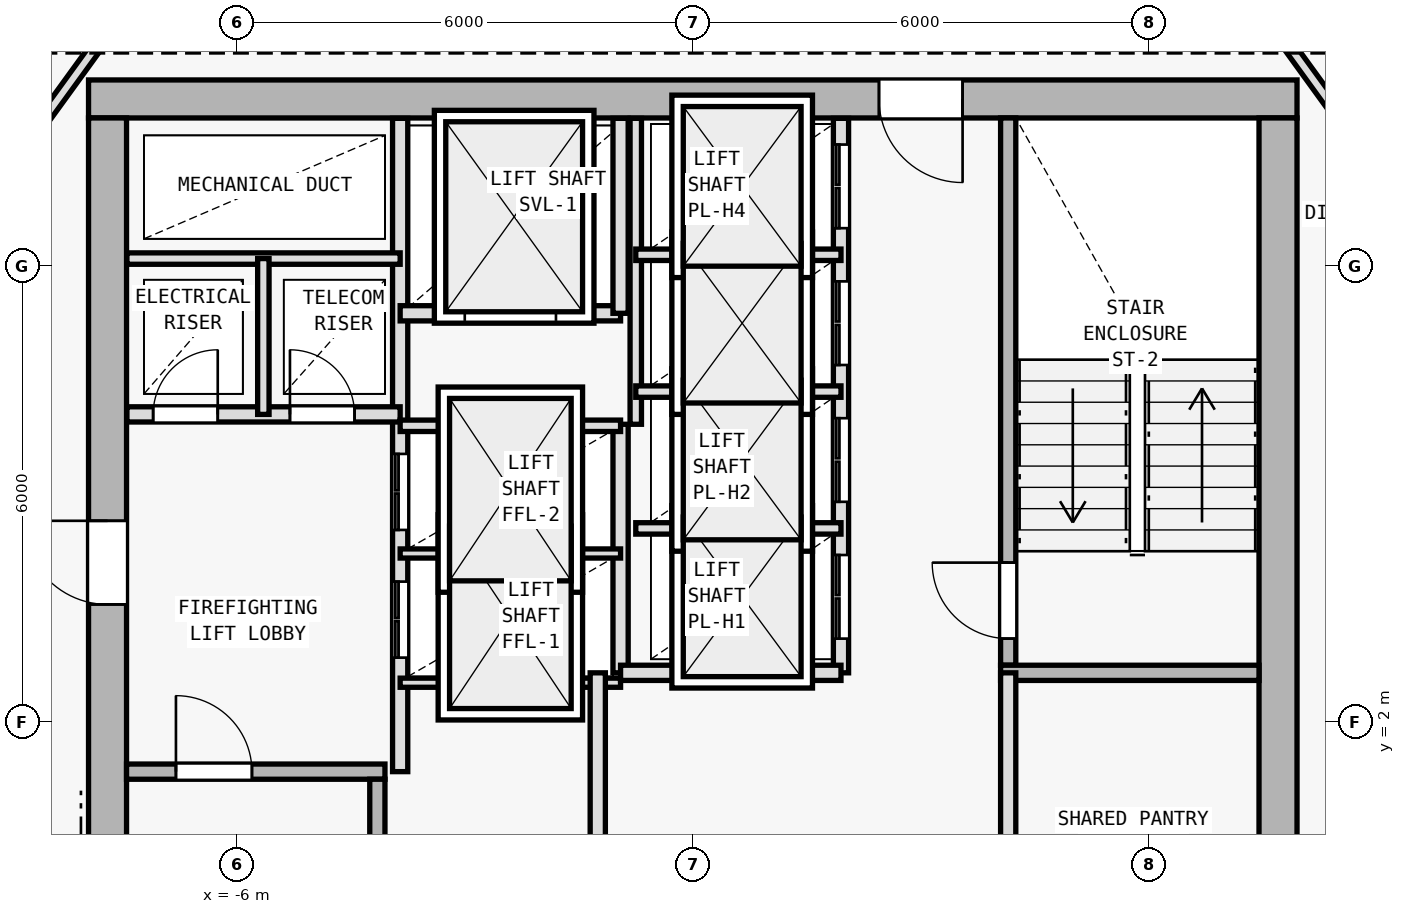
"""IFC4 building model, lengths in metres.
Left out: names, types, materials, properties, quantities, classifications, styles, units other than length and angle.
Written with IfcOpenShell. Run it as: python <this file> out.ifc"""

import sys

from ifc_helpers import new_model, si_unit, direction, frame, frame_2d, origin, origin_2d, place, context, subcontext, project, spatial, rectangle, i_section, extrude, element, fill, save


model = new_model("IFC4")
c1 = context("Model", 3, precision=1e-05, world=origin(), true_north=direction((0.0, 1.0)))
c2 = subcontext(c1, "Body", "Model", "MODEL_VIEW")
j1 = project(units=[si_unit("LENGTHUNIT", "METRE"), si_unit("PLANEANGLEUNIT", "RADIAN")], contexts=[c1])
p1 = place(None, origin())
s1 = spatial("IfcSite", under=j1, at=p1, CompositionType="ELEMENT")
p2 = place(p1, origin())
s2 = spatial("IfcBuilding", under=s1, at=p2, CompositionType="ELEMENT")
p3 = place(p2, frame((0.0, 0.0, 265.2)))
s3 = spatial("IfcBuildingStorey", under=s2, at=p3, CompositionType="ELEMENT", Elevation=265.2)
for number, where, z_axis, x_axis in (
    (1, (7.7, 10.2, 0.0), (0.0, 0.0, 1.0), (1.0, 0.0, 0.0)),
    (2, (-7.7, 10.2, 0.0), (0.0, 0.0, 1.0), (1.0, 0.0, 0.0)),
    (3, (7.7, 0.4, 0.0), (0.0, 0.0, 1.0), (1.0, 0.0, 0.0)),
    (4, (-7.7, 2.0, 0.0), (0.0, 0.0, 1.0), (1.0, 0.0, 0.0)),
):
    element("IfcColumn", number, at=place(p3, frame(where, z_axis=z_axis, x_axis=x_axis)), inside=s3, PredefinedType="COLUMN", context=c2, shape_type="SweptSolid", body=[
        extrude(i_section(OverallWidth=0.374, OverallDepth=0.372, WebThickness=0.012, FlangeThickness=0.02, FilletRadius=0.015, at=origin_2d()), origin(), (0.0, 0.0, 1.0), 3.6),
    ])
p4 = place(p3, frame((7.95, 10.2, 0.0), z_axis=(0.0, 0.0, 1.0), x_axis=(-1.0, 0.0, 0.0)))
e5 = element("IfcWall", 5, at=p4, inside=s3, PredefinedType="SHEAR", context=c2, shape_type="SweptSolid", body=[
    extrude(rectangle(XDim=15.9, YDim=0.5, at=frame_2d((7.95, 0.0))), origin(), (0.0, 0.0, 1.0), 3.35),
])
p5 = place(p4, frame((4.4, 0.0, 0.0)))
e6 = element("IfcOpeningElement", 6, at=p5, cuts=e5, PredefinedType="OPENING", context=c2, shape_type="SweptSolid", body=[
    extrude(rectangle(XDim=1.1, YDim=2.15, at=frame_2d((0.55, 1.075))), frame((0.0, 0.26, 0.0), z_axis=(0.0, -1.0, 0.0), x_axis=(1.0, 0.0, 0.0)), (0.0, 0.0, 1.0), 0.52),
])
p6 = place(p3, frame((-7.7, -9.15, 0.0), z_axis=(0.0, 0.0, 1.0), x_axis=(0.0, 1.0, 0.0)))
e7 = element("IfcWall", 7, at=p6, inside=s3, PredefinedType="SHEAR", context=c2, shape_type="SweptSolid", body=[
    extrude(rectangle(XDim=19.1, YDim=0.5, at=frame_2d((9.55, 0.0))), origin(), (0.0, 0.0, 1.0), 3.35),
])
p7 = place(p6, frame((12.7, 0.0, 0.0)))
e8 = element("IfcOpeningElement", 8, at=p7, cuts=e7, PredefinedType="OPENING", context=c2, shape_type="SweptSolid", body=[
    extrude(rectangle(XDim=1.1, YDim=2.15, at=frame_2d((0.55, 1.075))), frame((0.0, 0.26, 0.0), z_axis=(0.0, -1.0, 0.0), x_axis=(1.0, 0.0, 0.0)), (0.0, 0.0, 1.0), 0.52),
])
p8 = place(p3, frame((7.7, 9.95, 0.0), z_axis=(0.0, 0.0, 1.0), x_axis=(0.0, -1.0, 0.0)))
e9 = element("IfcWall", 9, at=p8, inside=s3, PredefinedType="SHEAR", context=c2, shape_type="SweptSolid", body=[
    extrude(rectangle(XDim=19.1, YDim=0.5, at=frame_2d((9.55, 0.0))), origin(), (0.0, 0.0, 1.0), 3.35),
])
p9 = place(p3, frame((-7.45, 1.35, 0.0), z_axis=(0.0, 0.0, 1.0), x_axis=(1.0, 0.0, 0.0)))
e10 = element("IfcWall", 10, at=p9, inside=s3, PredefinedType="SOLIDWALL", context=c2, shape_type="SweptSolid", body=[
    extrude(rectangle(XDim=3.4, YDim=0.2, at=frame_2d((1.7, 0.0))), origin(), (0.0, 0.0, 1.0), 3.35),
])
p10 = place(p9, frame((0.65, 0.0, 0.0)))
e11 = element("IfcOpeningElement", 11, at=p10, cuts=e10, PredefinedType="OPENING", context=c2, shape_type="SweptSolid", body=[
    extrude(rectangle(XDim=1.0, YDim=2.15, at=frame_2d((0.5, 1.075))), frame((0.0, 0.11, 0.0), z_axis=(0.0, -1.0, 0.0), x_axis=(1.0, 0.0, 0.0)), (0.0, 0.0, 1.0), 0.22),
])
p11 = place(p3, frame((-4.15, -5.95, 0.0), z_axis=(0.0, 0.0, 1.0), x_axis=(0.0, 1.0, 0.0)))
e12 = element("IfcWall", 12, at=p11, inside=s3, PredefinedType="SOLIDWALL", context=c2, shape_type="SweptSolid", body=[
    extrude(rectangle(XDim=7.2, YDim=0.2, at=frame_2d((3.6, 0.0))), origin(), (0.0, 0.0, 1.0), 3.35),
])
p12 = place(p3, frame((-3.85, 1.35, 0.0), z_axis=(0.0, 0.0, 1.0), x_axis=(0.0, 1.0, 0.0)))
e13 = element("IfcWall", 13, at=p12, inside=s3, PredefinedType="SOLIDWALL", context=c2, shape_type="SweptSolid", body=[
    extrude(rectangle(XDim=8.595, YDim=0.2, at=frame_2d((4.297, 0.0))), origin(), (0.0, 0.0, 1.0), 3.35),
])
p13 = place(p12, frame((1.5, 0.0, 0.0)))
e14 = element("IfcOpeningElement", 14, at=p13, cuts=e13, PredefinedType="OPENING", context=c2, shape_type="SweptSolid", body=[
    extrude(rectangle(XDim=1.0, YDim=2.15, at=frame_2d((0.5, 1.075))), frame((0.0, 0.11, 0.0), z_axis=(0.0, -1.0, 0.0), x_axis=(1.0, 0.0, 0.0)), (0.0, 0.0, 1.0), 0.22),
])
p14 = place(p12, frame((3.18, 0.0, 0.0)))
e15 = element("IfcOpeningElement", 15, at=p14, cuts=e13, PredefinedType="OPENING", context=c2, shape_type="SweptSolid", body=[
    extrude(rectangle(XDim=1.0, YDim=2.15, at=frame_2d((0.5, 1.075))), frame((0.0, 0.11, 0.0), z_axis=(0.0, -1.0, 0.0), x_axis=(1.0, 0.0, 0.0)), (0.0, 0.0, 1.0), 0.22),
])
p15 = place(p3, frame((-7.445, 6.05, 0.0), z_axis=(0.0, 0.0, 1.0), x_axis=(1.0, 0.0, 0.0)))
e16 = element("IfcWall", 16, at=p15, inside=s3, PredefinedType="SOLIDWALL", context=c2, shape_type="SweptSolid", body=[
    extrude(rectangle(XDim=3.595, YDim=0.2, at=frame_2d((1.797, 0.0))), origin(), (0.0, 0.0, 1.0), 3.35),
])
p16 = place(p15, frame((0.345, 0.0, 0.0)))
e17 = element("IfcOpeningElement", 17, at=p16, cuts=e16, PredefinedType="OPENING", context=c2, shape_type="SweptSolid", body=[
    extrude(rectangle(XDim=0.85, YDim=2.1, at=frame_2d((0.425, 1.05))), frame((0.0, 0.11, 0.0), z_axis=(0.0, -1.0, 0.0), x_axis=(1.0, 0.0, 0.0)), (0.0, 0.0, 1.0), 0.22),
])
p17 = place(p15, frame((2.145, 0.0, 0.0)))
e18 = element("IfcOpeningElement", 18, at=p17, cuts=e16, PredefinedType="OPENING", context=c2, shape_type="SweptSolid", body=[
    extrude(rectangle(XDim=0.85, YDim=2.1, at=frame_2d((0.425, 1.05))), frame((0.0, 0.11, 0.0), z_axis=(0.0, -1.0, 0.0), x_axis=(1.0, 0.0, 0.0)), (0.0, 0.0, 1.0), 0.22),
])
p18 = place(p3, frame((-7.445, 8.1, 0.0), z_axis=(0.0, 0.0, 1.0), x_axis=(1.0, 0.0, 0.0)))
e19 = element("IfcWall", 19, at=p18, inside=s3, PredefinedType="PARTITIONING", context=c2, shape_type="SweptSolid", body=[
    extrude(rectangle(XDim=3.595, YDim=0.15, at=frame_2d((1.797, 0.0))), origin(), (0.0, 0.0, 1.0), 3.35),
])
p19 = place(p3, frame((-5.65, 6.05, 0.0), z_axis=(0.0, 0.0, 1.0), x_axis=(0.0, 1.0, 0.0)))
e20 = element("IfcWall", 20, at=p19, inside=s3, PredefinedType="PARTITIONING", context=c2, shape_type="SweptSolid", body=[
    extrude(rectangle(XDim=2.05, YDim=0.15, at=frame_2d((1.025, 0.0))), origin(), (0.0, 0.0, 1.0), 3.35),
])
p20 = place(p3, frame((4.15, 2.75, 0.0), z_axis=(0.0, 0.0, 1.0), x_axis=(0.0, 1.0, 0.0)))
e21 = element("IfcWall", 21, at=p20, inside=s3, PredefinedType="SOLIDWALL", context=c2, shape_type="SweptSolid", body=[
    extrude(rectangle(XDim=7.2, YDim=0.2, at=frame_2d((3.6, 0.0))), origin(), (0.0, 0.0, 1.0), 3.35),
])
p21 = place(p20, frame((0.35, 0.0, 0.0)))
e22 = element("IfcOpeningElement", 22, at=p21, cuts=e21, PredefinedType="OPENING", context=c2, shape_type="SweptSolid", body=[
    extrude(rectangle(XDim=1.0, YDim=2.15, at=frame_2d((0.5, 1.075))), frame((0.0, 0.11, 0.0), z_axis=(0.0, -1.0, 0.0), x_axis=(1.0, 0.0, 0.0)), (0.0, 0.0, 1.0), 0.22),
])
p22 = place(p3, frame((4.05, 2.65, 0.0), z_axis=(0.0, 0.0, 1.0), x_axis=(1.0, 0.0, 0.0)))
e23 = element("IfcWall", 23, at=p22, inside=s3, PredefinedType="SOLIDWALL", context=c2, shape_type="SweptSolid", body=[
    extrude(rectangle(XDim=3.4, YDim=0.2, at=frame_2d((1.7, 0.0))), origin(), (0.0, 0.0, 1.0), 3.35),
])
p23 = place(p3, frame((-0.95, 2.65, 0.0), z_axis=(0.0, 0.0, 1.0), x_axis=(0.0, 1.0, 0.0)))
e24 = element("IfcWall", 24, at=p23, inside=s3, PredefinedType="SOLIDWALL", context=c2, shape_type="SweptSolid", body=[
    extrude(rectangle(XDim=3.27, YDim=0.2, at=frame_2d((1.635, 0.0))), origin(), (0.0, 0.0, 1.0), 3.35),
])
for number, where, z_axis, x_axis in (
    (25, (-3.85, 2.52, 0.0), (0.0, 0.0, 1.0), (1.0, 0.0, 0.0)),
    (26, (-3.85, 4.22, 0.0), (0.0, 0.0, 1.0), (1.0, 0.0, 0.0)),
):
    element("IfcWall", number, at=place(p3, frame(where, z_axis=z_axis, x_axis=x_axis)), inside=s3, PredefinedType="PARTITIONING", context=c2, shape_type="SweptSolid", body=[
        extrude(rectangle(XDim=2.9, YDim=0.12, at=frame_2d((1.45, 0.0))), origin(), (0.0, 0.0, 1.0), 3.35),
    ])
p24 = place(p3, frame((-3.85, 5.9, 0.0), z_axis=(0.0, 0.0, 1.0), x_axis=(1.0, 0.0, 0.0)))
e27 = element("IfcWall", 27, at=p24, inside=s3, PredefinedType="PARTITIONING", context=c2, shape_type="SweptSolid", body=[
    extrude(rectangle(XDim=2.9, YDim=0.15, at=frame_2d((1.45, 0.0))), origin(), (0.0, 0.0, 1.0), 3.35),
])
p25 = place(p3, frame((-3.85, 7.38, 0.0), z_axis=(0.0, 0.0, 1.0), x_axis=(1.0, 0.0, 0.0)))
e28 = element("IfcWall", 28, at=p25, inside=s3, PredefinedType="SOLIDWALL", context=c2, shape_type="SweptSolid", body=[
    extrude(rectangle(XDim=2.9, YDim=0.2, at=frame_2d((1.45, 0.0))), origin(), (0.0, 0.0, 1.0), 3.35),
])
p26 = place(p25, frame((0.85, 0.0, 0.0)))
e29 = element("IfcOpeningElement", 29, at=p26, cuts=e28, PredefinedType="OPENING", context=c2, shape_type="SweptSolid", body=[
    extrude(rectangle(XDim=1.2, YDim=2.2, at=frame_2d((0.6, 1.1))), frame((0.0, 0.11, 0.0), z_axis=(0.0, -1.0, 0.0), x_axis=(1.0, 0.0, 0.0)), (0.0, 0.0, 1.0), 0.22),
])
p27 = place(p3, frame((-0.95, 7.38, 0.0), z_axis=(0.0, 0.0, 1.0), x_axis=(0.0, 1.0, 0.0)))
e30 = element("IfcWall", 30, at=p27, inside=s3, PredefinedType="SOLIDWALL", context=c2, shape_type="SweptSolid", body=[
    extrude(rectangle(XDim=2.565, YDim=0.2, at=frame_2d((1.283, 0.0))), origin(), (0.0, 0.0, 1.0), 3.35),
])
p28 = place(p3, frame((4.15, -6.05, 0.0), z_axis=(0.0, 0.0, 1.0), x_axis=(0.0, 1.0, 0.0)))
e31 = element("IfcWall", 31, at=p28, inside=s3, PredefinedType="SOLIDWALL", context=c2, shape_type="SweptSolid", body=[
    extrude(rectangle(XDim=8.7, YDim=0.2, at=frame_2d((4.35, 0.0))), origin(), (0.0, 0.0, 1.0), 3.35),
])
p29 = place(p28, frame((3.6, 0.0, 0.0)))
e32 = element("IfcOpeningElement", 32, at=p29, cuts=e31, PredefinedType="OPENING", context=c2, shape_type="SweptSolid", body=[
    extrude(rectangle(XDim=0.95, YDim=2.1, at=frame_2d((0.475, 1.05))), frame((0.0, 0.11, 0.0), z_axis=(0.0, -1.0, 0.0), x_axis=(1.0, 0.0, 0.0)), (0.0, 0.0, 1.0), 0.22),
])
p30 = place(p3, frame((-1.25, -6.05, 0.0), z_axis=(0.0, 0.0, 1.0), x_axis=(0.0, 1.0, 0.0)))
e33 = element("IfcWall", 33, at=p30, inside=s3, PredefinedType="SOLIDWALL", context=c2, shape_type="SweptSolid", body=[
    extrude(rectangle(XDim=8.7, YDim=0.2, at=frame_2d((4.35, 0.0))), origin(), (0.0, 0.0, 1.0), 3.35),
])
p31 = place(p30, frame((3.4, 0.0, 0.0)))
e34 = element("IfcOpeningElement", 34, at=p31, cuts=e33, PredefinedType="OPENING", context=c2, shape_type="SweptSolid", body=[
    extrude(rectangle(XDim=0.95, YDim=2.1, at=frame_2d((0.475, 1.05))), frame((0.0, 0.11, 0.0), z_axis=(0.0, -1.0, 0.0), x_axis=(1.0, 0.0, 0.0)), (0.0, 0.0, 1.0), 0.22),
])
p32 = place(p3, frame((1.95, 2.65, 0.0), z_axis=(0.0, 0.0, 1.0), x_axis=(0.0, 1.0, 0.0)))
e35 = element("IfcWall", 35, at=p32, inside=s3, PredefinedType="SOLIDWALL", context=c2, shape_type="SweptSolid", body=[
    extrude(rectangle(XDim=7.295, YDim=0.2, at=frame_2d((3.647, 0.0))), origin(), (0.0, 0.0, 1.0), 3.35),
])
p33 = place(p32, frame((0.45, 0.0, 0.0)))
e36 = element("IfcOpeningElement", 36, at=p33, cuts=e35, PredefinedType="OPENING", context=c2, shape_type="SweptSolid", body=[
    extrude(rectangle(XDim=1.1, YDim=2.15, at=frame_2d((0.55, 1.075))), frame((0.0, 0.11, 0.0), z_axis=(0.0, -1.0, 0.0), x_axis=(1.0, 0.0, 0.0)), (0.0, 0.0, 1.0), 0.22),
])
p34 = place(p32, frame((2.25, 0.0, 0.0)))
e37 = element("IfcOpeningElement", 37, at=p34, cuts=e35, PredefinedType="OPENING", context=c2, shape_type="SweptSolid", body=[
    extrude(rectangle(XDim=1.1, YDim=2.15, at=frame_2d((0.55, 1.075))), frame((0.0, 0.11, 0.0), z_axis=(0.0, -1.0, 0.0), x_axis=(1.0, 0.0, 0.0)), (0.0, 0.0, 1.0), 0.22),
])
p35 = place(p32, frame((4.05, 0.0, 0.0)))
e38 = element("IfcOpeningElement", 38, at=p35, cuts=e35, PredefinedType="OPENING", context=c2, shape_type="SweptSolid", body=[
    extrude(rectangle(XDim=1.1, YDim=2.15, at=frame_2d((0.55, 1.075))), frame((0.0, 0.11, 0.0), z_axis=(0.0, -1.0, 0.0), x_axis=(1.0, 0.0, 0.0)), (0.0, 0.0, 1.0), 0.22),
])
p36 = place(p32, frame((5.85, 0.0, 0.0)))
e39 = element("IfcOpeningElement", 39, at=p36, cuts=e35, PredefinedType="OPENING", context=c2, shape_type="SweptSolid", body=[
    extrude(rectangle(XDim=1.1, YDim=2.15, at=frame_2d((0.55, 1.075))), frame((0.0, 0.11, 0.0), z_axis=(0.0, -1.0, 0.0), x_axis=(1.0, 0.0, 0.0)), (0.0, 0.0, 1.0), 0.22),
])
p37 = place(p3, frame((-0.95, 2.65, 0.0), z_axis=(0.0, 0.0, 1.0), x_axis=(1.0, 0.0, 0.0)))
e40 = element("IfcWall", 40, at=p37, inside=s3, PredefinedType="SOLIDWALL", context=c2, shape_type="SweptSolid", body=[
    extrude(rectangle(XDim=2.9, YDim=0.2, at=frame_2d((1.45, 0.0))), origin(), (0.0, 0.0, 1.0), 3.35),
])
p38 = place(p3, frame((-0.75, 5.92, 0.0), z_axis=(0.0, 0.0, 1.0), x_axis=(0.0, 1.0, 0.0)))
e41 = element("IfcWall", 41, at=p38, inside=s3, PredefinedType="PARTITIONING", context=c2, shape_type="SweptSolid", body=[
    extrude(rectangle(XDim=4.025, YDim=0.15, at=frame_2d((2.013, 0.0))), origin(), (0.0, 0.0, 1.0), 3.35),
])
for number, where, z_axis, x_axis in (
    (42, (-0.75, 4.55, 0.0), (0.0, 0.0, 1.0), (1.0, 0.0, 0.0)),
    (43, (-0.75, 6.35, 0.0), (0.0, 0.0, 1.0), (1.0, 0.0, 0.0)),
    (44, (-0.75, 8.15, 0.0), (0.0, 0.0, 1.0), (1.0, 0.0, 0.0)),
):
    element("IfcWall", number, at=place(p3, frame(where, z_axis=z_axis, x_axis=x_axis)), inside=s3, PredefinedType="PARTITIONING", context=c2, shape_type="SweptSolid", body=[
        extrude(rectangle(XDim=2.7, YDim=0.15, at=frame_2d((1.35, 0.0))), origin(), (0.0, 0.0, 1.0), 3.35),
    ])
p39 = place(p3, frame((-9.78, 8.226, 0.0), z_axis=(0.0, 0.0, 1.0), x_axis=(0.586956386413, 0.809618552436, 0.0)))
e45 = element("IfcWall", 45, at=p39, inside=s3, PredefinedType="PARTITIONING", context=c2, shape_type="SweptSolid", body=[
    extrude(rectangle(XDim=5.008, YDim=0.15, at=frame_2d((2.504, 0.0))), origin(), (0.0, 0.0, 1.0), 3.015),
])
p40 = place(p3, frame((6.841, 12.28, 0.0), z_axis=(0.0, 0.0, 1.0), x_axis=(0.586956386413, -0.809618552436, 0.0)))
e46 = element("IfcWall", 46, at=p40, inside=s3, PredefinedType="PARTITIONING", context=c2, shape_type="SweptSolid", body=[
    extrude(rectangle(XDim=5.008, YDim=0.15, at=frame_2d((2.504, 0.0))), origin(), (0.0, 0.0, 1.0), 2.965),
])
p41 = place(p40, frame((2.954, 0.0, 0.0)))
e47 = element("IfcOpeningElement", 47, at=p41, cuts=e46, PredefinedType="OPENING", context=c2, shape_type="SweptSolid", body=[
    extrude(rectangle(XDim=0.9, YDim=2.1, at=frame_2d((0.45, 1.05))), frame((0.0, 0.085, 0.0), z_axis=(0.0, -1.0, 0.0), x_axis=(1.0, 0.0, 0.0)), (0.0, 0.0, 1.0), 0.17),
])
p42 = place(p7, origin())
e48 = element("IfcDoor", 48, at=p42, inside=s3, OperationType="SINGLE_SWING_RIGHT", PredefinedType="DOOR", context=c2, shape_type="SweptSolid", body=[
    extrude(rectangle(XDim=1.1, YDim=2.15, at=frame_2d((0.55, 1.075))), frame((0.0, 0.025, 0.0), z_axis=(0.0, -1.0, 0.0), x_axis=(1.0, 0.0, 0.0)), (0.0, 0.0, 1.0), 0.05),
])
fill(e8, e48)
p43 = place(p5, origin())
e49 = element("IfcDoor", 49, at=p43, inside=s3, OperationType="SINGLE_SWING_LEFT", PredefinedType="DOOR", context=c2, shape_type="SweptSolid", body=[
    extrude(rectangle(XDim=1.1, YDim=2.15, at=frame_2d((0.55, 1.075))), frame((0.0, 0.025, 0.0), z_axis=(0.0, -1.0, 0.0), x_axis=(1.0, 0.0, 0.0)), (0.0, 0.0, 1.0), 0.05),
])
fill(e6, e49)
p44 = place(p10, origin())
e50 = element("IfcDoor", 50, at=p44, inside=s3, OperationType="SINGLE_SWING_LEFT", PredefinedType="DOOR", context=c2, shape_type="SweptSolid", body=[
    extrude(rectangle(XDim=1.0, YDim=2.15, at=frame_2d((0.5, 1.075))), frame((0.0, 0.025, 0.0), z_axis=(0.0, -1.0, 0.0), x_axis=(1.0, 0.0, 0.0)), (0.0, 0.0, 1.0), 0.05),
])
fill(e11, e50)
p45 = place(p16, origin())
e51 = element("IfcDoor", 51, at=p45, inside=s3, OperationType="SINGLE_SWING_RIGHT", PredefinedType="DOOR", context=c2, shape_type="SweptSolid", body=[
    extrude(rectangle(XDim=0.85, YDim=2.1, at=frame_2d((0.425, 1.05))), frame((0.0, 0.025, 0.0), z_axis=(0.0, -1.0, 0.0), x_axis=(1.0, 0.0, 0.0)), (0.0, 0.0, 1.0), 0.05),
])
fill(e17, e51)
p46 = place(p17, origin())
e52 = element("IfcDoor", 52, at=p46, inside=s3, OperationType="SINGLE_SWING_LEFT", PredefinedType="DOOR", context=c2, shape_type="SweptSolid", body=[
    extrude(rectangle(XDim=0.85, YDim=2.1, at=frame_2d((0.425, 1.05))), frame((0.0, 0.025, 0.0), z_axis=(0.0, -1.0, 0.0), x_axis=(1.0, 0.0, 0.0)), (0.0, 0.0, 1.0), 0.05),
])
fill(e18, e52)
p47 = place(p21, origin())
e53 = element("IfcDoor", 53, at=p47, inside=s3, OperationType="SINGLE_SWING_RIGHT", PredefinedType="DOOR", context=c2, shape_type="SweptSolid", body=[
    extrude(rectangle(XDim=1.0, YDim=2.15, at=frame_2d((0.5, 1.075))), frame((0.0, 0.025, 0.0), z_axis=(0.0, -1.0, 0.0), x_axis=(1.0, 0.0, 0.0)), (0.0, 0.0, 1.0), 0.05),
])
fill(e22, e53)
p48 = place(p26, origin())
e54 = element("IfcDoor", 54, at=p48, inside=s3, OperationType="DOUBLE_DOOR_SLIDING", PredefinedType="DOOR", context=c2, shape_type="SweptSolid", body=[
    extrude(rectangle(XDim=1.2, YDim=2.2, at=frame_2d((0.6, 1.1))), frame((0.0, 0.025, 0.0), z_axis=(0.0, -1.0, 0.0), x_axis=(1.0, 0.0, 0.0)), (0.0, 0.0, 1.0), 0.05),
])
fill(e29, e54)
p49 = place(p33, origin())
e55 = element("IfcDoor", 55, at=p49, inside=s3, OperationType="DOUBLE_DOOR_SLIDING", PredefinedType="DOOR", context=c2, shape_type="SweptSolid", body=[
    extrude(rectangle(XDim=1.1, YDim=2.15, at=frame_2d((0.55, 1.075))), frame((0.0, 0.025, 0.0), z_axis=(0.0, -1.0, 0.0), x_axis=(1.0, 0.0, 0.0)), (0.0, 0.0, 1.0), 0.05),
])
fill(e36, e55)
p50 = place(p34, origin())
e56 = element("IfcDoor", 56, at=p50, inside=s3, OperationType="DOUBLE_DOOR_SLIDING", PredefinedType="DOOR", context=c2, shape_type="SweptSolid", body=[
    extrude(rectangle(XDim=1.1, YDim=2.15, at=frame_2d((0.55, 1.075))), frame((0.0, 0.025, 0.0), z_axis=(0.0, -1.0, 0.0), x_axis=(1.0, 0.0, 0.0)), (0.0, 0.0, 1.0), 0.05),
])
fill(e37, e56)
p51 = place(p35, origin())
e57 = element("IfcDoor", 57, at=p51, inside=s3, OperationType="DOUBLE_DOOR_SLIDING", PredefinedType="DOOR", context=c2, shape_type="SweptSolid", body=[
    extrude(rectangle(XDim=1.1, YDim=2.15, at=frame_2d((0.55, 1.075))), frame((0.0, 0.025, 0.0), z_axis=(0.0, -1.0, 0.0), x_axis=(1.0, 0.0, 0.0)), (0.0, 0.0, 1.0), 0.05),
])
fill(e38, e57)
p52 = place(p36, origin())
e58 = element("IfcDoor", 58, at=p52, inside=s3, OperationType="DOUBLE_DOOR_SLIDING", PredefinedType="DOOR", context=c2, shape_type="SweptSolid", body=[
    extrude(rectangle(XDim=1.1, YDim=2.15, at=frame_2d((0.55, 1.075))), frame((0.0, 0.025, 0.0), z_axis=(0.0, -1.0, 0.0), x_axis=(1.0, 0.0, 0.0)), (0.0, 0.0, 1.0), 0.05),
])
fill(e39, e58)
p53 = place(p13, origin())
e59 = element("IfcDoor", 59, at=p53, inside=s3, OperationType="DOUBLE_DOOR_SLIDING", PredefinedType="DOOR", context=c2, shape_type="SweptSolid", body=[
    extrude(rectangle(XDim=1.0, YDim=2.15, at=frame_2d((0.5, 1.075))), frame((0.0, 0.025, 0.0), z_axis=(0.0, -1.0, 0.0), x_axis=(1.0, 0.0, 0.0)), (0.0, 0.0, 1.0), 0.05),
])
fill(e14, e59)
p54 = place(p14, origin())
e60 = element("IfcDoor", 60, at=p54, inside=s3, OperationType="DOUBLE_DOOR_SLIDING", PredefinedType="DOOR", context=c2, shape_type="SweptSolid", body=[
    extrude(rectangle(XDim=1.0, YDim=2.15, at=frame_2d((0.5, 1.075))), frame((0.0, 0.025, 0.0), z_axis=(0.0, -1.0, 0.0), x_axis=(1.0, 0.0, 0.0)), (0.0, 0.0, 1.0), 0.05),
])
fill(e15, e60)
save(model, sys.argv[1])
